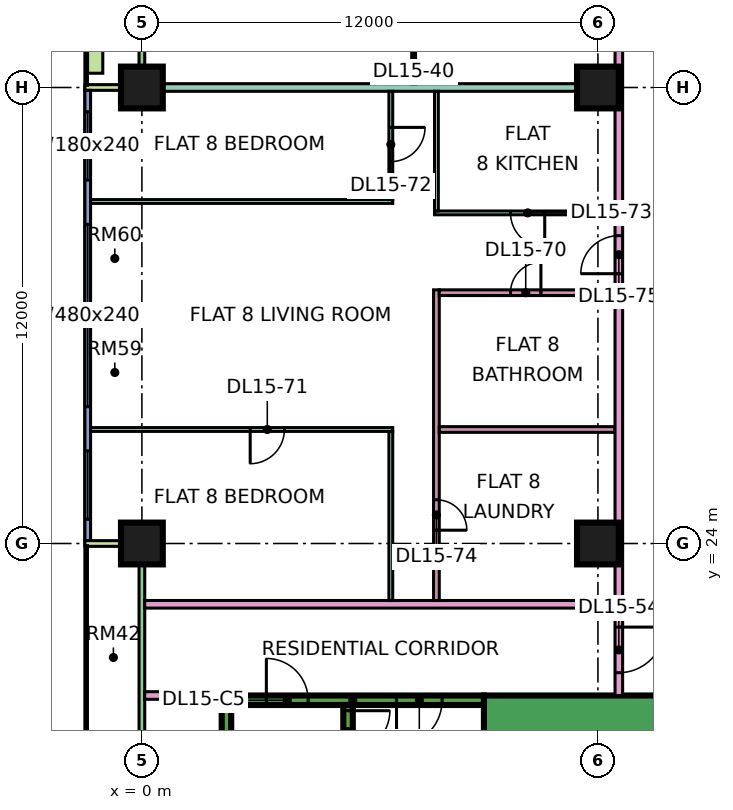
"""IFC4 building model, lengths in metres.
Left out: names, types, materials, properties, quantities, classifications, styles, units other than length and angle.
Written with IfcOpenShell. Run it as: python <this file> out.ifc"""

import sys

from ifc_helpers import new_model, si_unit, direction, frame, frame_2d, origin, origin_2d, place, context, subcontext, project, spatial, rectangle, extrude, element, fill, save


model = new_model("IFC4")
c1 = context("Model", 3, precision=1e-05, world=origin(), true_north=direction((0.0, 1.0)))
c2 = subcontext(c1, "Body", "Model", "MODEL_VIEW")
j1 = project(units=[si_unit("LENGTHUNIT", "METRE"), si_unit("PLANEANGLEUNIT", "RADIAN")], contexts=[c1])
p1 = place(None, origin())
s1 = spatial("IfcSite", under=j1, at=p1, CompositionType="ELEMENT")
p2 = place(p1, origin())
s2 = spatial("IfcBuilding", under=s1, at=p2, CompositionType="ELEMENT")
p3 = place(p2, frame((0.0, 0.0, 71.4)))
s3 = spatial("IfcBuildingStorey", under=s2, at=p3, CompositionType="ELEMENT", Elevation=71.4)
p4 = place(p3, frame((0.0, 24.0, 0.0), z_axis=(0.0, 0.0, 1.0), x_axis=(1.0, 0.0, 0.0)))
e1 = element("IfcColumn", 1, at=p4, inside=s3, PredefinedType="COLUMN", context=c2, shape_type="SweptSolid", body=[
    extrude(rectangle(XDim=1.1, YDim=1.1, at=origin_2d()), origin(), (0.0, 0.0, 1.0), 3.75),
])
p5 = place(p3, frame((0.0, 36.0, 0.0), z_axis=(0.0, 0.0, 1.0), x_axis=(1.0, 0.0, 0.0)))
e2 = element("IfcColumn", 2, at=p5, inside=s3, PredefinedType="COLUMN", context=c2, shape_type="SweptSolid", body=[
    extrude(rectangle(XDim=1.1, YDim=1.1, at=origin_2d()), origin(), (0.0, 0.0, 1.0), 3.75),
])
for number, where, z_axis, x_axis in (
    (3, (12.0, 24.0, 0.0), (0.0, 0.0, 1.0), (1.0, 0.0, 0.0)),
    (4, (12.0, 36.0, 0.0), (0.0, 0.0, 1.0), (1.0, 0.0, 0.0)),
):
    element("IfcColumn", number, at=place(p3, frame(where, z_axis=z_axis, x_axis=x_axis)), inside=s3, PredefinedType="COLUMN", context=c2, shape_type="SweptSolid", body=[
        extrude(rectangle(XDim=1.1, YDim=1.1, at=origin_2d()), origin(), (0.0, 0.0, 1.0), 3.75),
    ])
p6 = place(p3, frame((9.0, 19.45, 0.0), z_axis=(0.0, 0.0, 1.0), x_axis=(1.0, 0.0, 0.0)))
e5 = element("IfcWall", 5, at=p6, inside=s3, PredefinedType="SHEAR", context=c2, shape_type="SweptSolid", body=[
    extrude(rectangle(XDim=25.0, YDim=1.1, at=frame_2d((12.5, 0.0))), origin(), (0.0, 0.0, 1.0), 3.75),
])
p7 = place(p6, frame((19.1, 0.0, 0.0)))
e6 = element("IfcOpeningElement", 6, at=p7, cuts=e5, PredefinedType="OPENING", context=c2, shape_type="SweptSolid", body=[
    extrude(rectangle(XDim=1.8, YDim=2.4, at=frame_2d((0.9, 1.2))), frame((0.0, 0.56, 0.0), z_axis=(0.0, -1.0, 0.0), x_axis=(1.0, 0.0, 0.0)), (0.0, 0.0, 1.0), 1.12),
])
p8 = place(p3, frame((2.1, 19.875, 0.0), z_axis=(0.0, 0.0, 1.0), x_axis=(1.0, 0.0, 0.0)))
e7 = element("IfcWall", 7, at=p8, inside=s3, PredefinedType="SHEAR", context=c2, shape_type="SweptSolid", body=[
    extrude(rectangle(XDim=6.9, YDim=0.25, at=frame_2d((3.45, 0.0))), origin(), (0.0, 0.0, 1.0), 3.75),
])
p9 = place(p8, frame((1.175, 0.0, 0.0)))
e8 = element("IfcOpeningElement", 8, at=p9, cuts=e7, PredefinedType="OPENING", context=c2, shape_type="SweptSolid", body=[
    extrude(rectangle(XDim=1.1, YDim=2.2, at=frame_2d((0.55, 1.1))), frame((0.0, 0.135, 0.0), z_axis=(0.0, -1.0, 0.0), x_axis=(1.0, 0.0, 0.0)), (0.0, 0.0, 1.0), 0.27),
])
p10 = place(p8, frame((4.6, 0.0, 0.0)))
e9 = element("IfcOpeningElement", 9, at=p10, cuts=e7, PredefinedType="OPENING", context=c2, shape_type="SweptSolid", body=[
    extrude(rectangle(XDim=1.2, YDim=2.2, at=frame_2d((0.6, 1.1))), frame((0.0, 0.135, 0.0), z_axis=(0.0, -1.0, 0.0), x_axis=(1.0, 0.0, 0.0)), (0.0, 0.0, 1.0), 0.27),
])
p11 = place(p3, frame((2.225, 13.25, 0.0), z_axis=(0.0, 0.0, 1.0), x_axis=(0.0, 1.0, 0.0)))
e10 = element("IfcWall", 10, at=p11, inside=s3, PredefinedType="SHEAR", context=c2, shape_type="SweptSolid", body=[
    extrude(rectangle(XDim=6.5, YDim=0.25, at=frame_2d((3.25, 0.0))), origin(), (0.0, 0.0, 1.0), 3.75),
])
p12 = place(p3, frame((5.425, 13.25, 0.0), z_axis=(0.0, 0.0, 1.0), x_axis=(0.0, 1.0, 0.0)))
e11 = element("IfcWall", 11, at=p12, inside=s3, PredefinedType="SHEAR", context=c2, shape_type="SweptSolid", body=[
    extrude(rectangle(XDim=6.5, YDim=0.25, at=frame_2d((3.25, 0.0))), origin(), (0.0, 0.0, 1.0), 3.75),
])
p13 = place(p12, frame((5.25, 0.0, 0.0)))
e12 = element("IfcOpeningElement", 12, at=p13, cuts=e11, PredefinedType="OPENING", context=c2, shape_type="SweptSolid", body=[
    extrude(rectangle(XDim=1.1, YDim=2.2, at=frame_2d((0.55, 1.1))), frame((0.0, 0.135, 0.0), z_axis=(0.0, -1.0, 0.0), x_axis=(1.0, 0.0, 0.0)), (0.0, 0.0, 1.0), 0.27),
])
p14 = place(p3, frame((0.0, 47.925, 0.0), z_axis=(0.0, 0.0, 1.0), x_axis=(0.0, -1.0, 0.0)))
e13 = element("IfcWall", 13, at=p14, inside=s3, PredefinedType="SOLIDWALL", context=c2, shape_type="SweptSolid", body=[
    extrude(rectangle(XDim=11.85, YDim=0.15, at=frame_2d((5.925, 0.0))), origin(), (0.0, 0.0, 1.0), 3.35),
])
p15 = place(p14, frame((0.538, 0.0, 0.45)))
e14 = element("IfcOpeningElement", 14, at=p15, cuts=e13, PredefinedType="OPENING", context=c2, shape_type="SweptSolid", body=[
    extrude(rectangle(XDim=1.2, YDim=2.4, at=frame_2d((0.6, 1.2))), frame((0.0, 0.085, 0.0), z_axis=(0.0, -1.0, 0.0), x_axis=(1.0, 0.0, 0.0)), (0.0, 0.0, 1.0), 0.17),
])
p16 = place(p14, frame((4.15, 0.0, 0.45)))
e15 = element("IfcOpeningElement", 15, at=p16, cuts=e13, PredefinedType="OPENING", context=c2, shape_type="SweptSolid", body=[
    extrude(rectangle(XDim=1.2, YDim=2.4, at=frame_2d((0.6, 1.2))), frame((0.0, 0.085, 0.0), z_axis=(0.0, -1.0, 0.0), x_axis=(1.0, 0.0, 0.0)), (0.0, 0.0, 1.0), 0.17),
])
p17 = place(p14, frame((6.525, 0.0, 0.0)))
e16 = element("IfcOpeningElement", 16, at=p17, cuts=e13, PredefinedType="OPENING", context=c2, shape_type="SweptSolid", body=[
    extrude(rectangle(XDim=1.8, YDim=2.4, at=frame_2d((0.9, 1.2))), frame((0.0, 0.085, 0.0), z_axis=(0.0, -1.0, 0.0), x_axis=(1.0, 0.0, 0.0)), (0.0, 0.0, 1.0), 0.17),
])
p18 = place(p14, frame((9.5, 0.0, 0.45)))
e17 = element("IfcOpeningElement", 17, at=p18, cuts=e13, PredefinedType="OPENING", context=c2, shape_type="SweptSolid", body=[
    extrude(rectangle(XDim=1.2, YDim=2.4, at=frame_2d((0.6, 1.2))), frame((0.0, 0.085, 0.0), z_axis=(0.0, -1.0, 0.0), x_axis=(1.0, 0.0, 0.0)), (0.0, 0.0, 1.0), 0.17),
])
p19 = place(p3, frame((-1.5, 36.0, 0.0), z_axis=(0.0, 0.0, 1.0), x_axis=(1.0, 0.0, 0.0)))
e18 = element("IfcWall", 18, at=p19, inside=s3, PredefinedType="SOLIDWALL", context=c2, shape_type="SweptSolid", body=[
    extrude(rectangle(XDim=1.5, YDim=0.15, at=frame_2d((0.75, 0.0))), origin(), (0.0, 0.0, 1.0), 3.35),
])
p20 = place(p3, frame((-1.425, 35.925, 0.0), z_axis=(0.0, 0.0, 1.0), x_axis=(0.0, -1.0, 0.0)))
e19 = element("IfcWall", 19, at=p20, inside=s3, PredefinedType="SOLIDWALL", context=c2, shape_type="SweptSolid", body=[
    extrude(rectangle(XDim=11.85, YDim=0.15, at=frame_2d((5.925, 0.0))), origin(), (0.0, 0.0, 1.0), 3.35),
])
p21 = place(p20, frame((0.562, 0.0, 0.45)))
e20 = element("IfcOpeningElement", 20, at=p21, cuts=e19, PredefinedType="OPENING", context=c2, shape_type="SweptSolid", body=[
    extrude(rectangle(XDim=1.8, YDim=2.4, at=frame_2d((0.9, 1.2))), frame((0.0, 0.085, 0.0), z_axis=(0.0, -1.0, 0.0), x_axis=(1.0, 0.0, 0.0)), (0.0, 0.0, 1.0), 0.17),
])
p22 = place(p20, frame((3.525, 0.0, 0.45)))
e21 = element("IfcOpeningElement", 21, at=p22, cuts=e19, PredefinedType="OPENING", context=c2, shape_type="SweptSolid", body=[
    extrude(rectangle(XDim=4.8, YDim=2.4, at=frame_2d((2.4, 1.2))), frame((0.0, 0.085, 0.0), z_axis=(0.0, -1.0, 0.0), x_axis=(1.0, 0.0, 0.0)), (0.0, 0.0, 1.0), 0.17),
])
p23 = place(p20, frame((9.488, 0.0, 0.45)))
e22 = element("IfcOpeningElement", 22, at=p23, cuts=e19, PredefinedType="OPENING", context=c2, shape_type="SweptSolid", body=[
    extrude(rectangle(XDim=1.8, YDim=2.4, at=frame_2d((0.9, 1.2))), frame((0.0, 0.085, 0.0), z_axis=(0.0, -1.0, 0.0), x_axis=(1.0, 0.0, 0.0)), (0.0, 0.0, 1.0), 0.17),
])
p24 = place(p3, frame((0.0, 23.925, 0.0), z_axis=(0.0, 0.0, 1.0), x_axis=(0.0, -1.0, 0.0)))
e23 = element("IfcWall", 23, at=p24, inside=s3, PredefinedType="SOLIDWALL", context=c2, shape_type="SweptSolid", body=[
    extrude(rectangle(XDim=11.35, YDim=0.15, at=frame_2d((5.675, 0.0))), origin(), (0.0, 0.0, 1.0), 3.35),
])
p25 = place(p24, frame((6.738, 0.0, 0.0)))
e24 = element("IfcOpeningElement", 24, at=p25, cuts=e23, PredefinedType="OPENING", context=c2, shape_type="SweptSolid", body=[
    extrude(rectangle(XDim=1.8, YDim=2.4, at=frame_2d((0.9, 1.2))), frame((0.0, 0.085, 0.0), z_axis=(0.0, -1.0, 0.0), x_axis=(1.0, 0.0, 0.0)), (0.0, 0.0, 1.0), 0.17),
])
p26 = place(p3, frame((-1.5, 24.0, 0.0), z_axis=(0.0, 0.0, 1.0), x_axis=(1.0, 0.0, 0.0)))
e25 = element("IfcWall", 25, at=p26, inside=s3, PredefinedType="SOLIDWALL", context=c2, shape_type="SweptSolid", body=[
    extrude(rectangle(XDim=1.5, YDim=0.15, at=frame_2d((0.75, 0.0))), origin(), (0.0, 0.0, 1.0), 3.35),
])
p27 = place(p3, frame((-1.229, 47.625, 0.0), z_axis=(0.0, 0.0, 1.0), x_axis=(0.0, -1.0, 0.0)))
e26 = element("IfcWall", 26, at=p27, inside=s3, PredefinedType="SOLIDWALL", context=c2, shape_type="SweptSolid", body=[
    extrude(rectangle(XDim=11.25, YDim=0.4, at=frame_2d((5.625, 0.0))), origin(), (0.0, 0.0, 1.0), 0.7),
])
p28 = place(p3, frame((-1.35, 27.0, 0.0), z_axis=(0.0, 0.0, 1.0), x_axis=(1.0, 0.0, 0.0)))
e27 = element("IfcWall", 27, at=p28, inside=s3, PredefinedType="PARTITIONING", context=c2, shape_type="SweptSolid", body=[
    extrude(rectangle(XDim=7.95, YDim=0.1, at=frame_2d((3.975, 0.0))), origin(), (0.0, 0.0, 1.0), 3.35),
])
p29 = place(p28, frame((4.2, 0.0, 0.0)))
e28 = element("IfcOpeningElement", 28, at=p29, cuts=e27, PredefinedType="OPENING", context=c2, shape_type="SweptSolid", body=[
    extrude(rectangle(XDim=0.9, YDim=2.1, at=frame_2d((0.45, 1.05))), frame((0.0, 0.06, 0.0), z_axis=(0.0, -1.0, 0.0), x_axis=(1.0, 0.0, 0.0)), (0.0, 0.0, 1.0), 0.12),
])
p30 = place(p3, frame((-1.35, 33.0, 0.0), z_axis=(0.0, 0.0, 1.0), x_axis=(1.0, 0.0, 0.0)))
e29 = element("IfcWall", 29, at=p30, inside=s3, PredefinedType="PARTITIONING", context=c2, shape_type="SweptSolid", body=[
    extrude(rectangle(XDim=7.95, YDim=0.1, at=frame_2d((3.975, 0.0))), origin(), (0.0, 0.0, 1.0), 3.35),
])
e30 = element("IfcWall", 30, at=p5, inside=s3, PredefinedType="PARTITIONING", context=c2, shape_type="SweptSolid", body=[
    extrude(rectangle(XDim=12.45, YDim=0.2, at=frame_2d((6.225, 0.0))), origin(), (0.0, 0.0, 1.0), 3.35),
])
p31 = place(p3, frame((0.074, 20.0, 0.0), z_axis=(0.0, 0.0, 1.0), x_axis=(1.0, 0.0, 0.0)))
e31 = element("IfcWall", 31, at=p31, inside=s3, PredefinedType="PARTITIONING", context=c2, shape_type="SweptSolid", body=[
    extrude(rectangle(XDim=2.026, YDim=0.2, at=frame_2d((1.013, 0.0))), origin(), (0.0, 0.0, 1.0), 3.35),
])
p32 = place(p3, frame((0.074, 22.4, 0.0), z_axis=(0.0, 0.0, 1.0), x_axis=(1.0, 0.0, 0.0)))
e32 = element("IfcWall", 32, at=p32, inside=s3, PredefinedType="PARTITIONING", context=c2, shape_type="SweptSolid", body=[
    extrude(rectangle(XDim=12.376, YDim=0.2, at=frame_2d((6.188, 0.0))), origin(), (0.0, 0.0, 1.0), 3.35),
])
p33 = place(p3, frame((6.55, 22.5, 0.0), z_axis=(0.0, 0.0, 1.0), x_axis=(0.0, 1.0, 0.0)))
e33 = element("IfcWall", 33, at=p33, inside=s3, PredefinedType="PARTITIONING", context=c2, shape_type="SweptSolid", body=[
    extrude(rectangle(XDim=4.45, YDim=0.1, at=frame_2d((2.225, 0.0))), origin(), (0.0, 0.0, 1.0), 3.35),
])
p34 = place(p3, frame((6.55, 33.05, 0.0), z_axis=(0.0, 0.0, 1.0), x_axis=(0.0, 1.0, 0.0)))
e34 = element("IfcWall", 34, at=p34, inside=s3, PredefinedType="PARTITIONING", context=c2, shape_type="SweptSolid", body=[
    extrude(rectangle(XDim=2.85, YDim=0.1, at=frame_2d((1.425, 0.0))), origin(), (0.0, 0.0, 1.0), 3.35),
])
p35 = place(p34, frame((1.0, 0.0, 0.0)))
e35 = element("IfcOpeningElement", 35, at=p35, cuts=e34, PredefinedType="OPENING", context=c2, shape_type="SweptSolid", body=[
    extrude(rectangle(XDim=0.9, YDim=2.1, at=frame_2d((0.45, 1.05))), frame((0.0, 0.06, 0.0), z_axis=(0.0, -1.0, 0.0), x_axis=(1.0, 0.0, 0.0)), (0.0, 0.0, 1.0), 0.12),
])
p36 = place(p3, frame((7.15, 36.1, 0.0), z_axis=(0.0, 0.0, 1.0), x_axis=(0.0, 1.0, 0.0)))
e36 = element("IfcWall", 36, at=p36, inside=s3, PredefinedType="PARTITIONING", context=c2, shape_type="SweptSolid", body=[
    extrude(rectangle(XDim=2.85, YDim=0.1, at=frame_2d((1.425, 0.0))), origin(), (0.0, 0.0, 1.0), 3.35),
])
p37 = place(p36, frame((0.95, 0.0, 0.0)))
e37 = element("IfcOpeningElement", 37, at=p37, cuts=e36, PredefinedType="OPENING", context=c2, shape_type="SweptSolid", body=[
    extrude(rectangle(XDim=0.9, YDim=2.1, at=frame_2d((0.45, 1.05))), frame((0.0, 0.06, 0.0), z_axis=(0.0, -1.0, 0.0), x_axis=(1.0, 0.0, 0.0)), (0.0, 0.0, 1.0), 0.12),
])
p38 = place(p3, frame((7.7, 32.7, 0.0), z_axis=(0.0, 0.0, 1.0), x_axis=(1.0, 0.0, 0.0)))
e38 = element("IfcWall", 38, at=p38, inside=s3, PredefinedType="PARTITIONING", context=c2, shape_type="SweptSolid", body=[
    extrude(rectangle(XDim=4.75, YDim=0.1, at=frame_2d((2.375, 0.0))), origin(), (0.0, 0.0, 1.0), 3.35),
])
p39 = place(p38, frame((2.0, 0.0, 0.0)))
e39 = element("IfcOpeningElement", 39, at=p39, cuts=e38, PredefinedType="OPENING", context=c2, shape_type="SweptSolid", body=[
    extrude(rectangle(XDim=0.9, YDim=2.1, at=frame_2d((0.45, 1.05))), frame((0.0, 0.06, 0.0), z_axis=(0.0, -1.0, 0.0), x_axis=(1.0, 0.0, 0.0)), (0.0, 0.0, 1.0), 0.12),
])
p40 = place(p3, frame((7.75, 22.5, 0.0), z_axis=(0.0, 0.0, 1.0), x_axis=(0.0, 1.0, 0.0)))
e40 = element("IfcWall", 40, at=p40, inside=s3, PredefinedType="PARTITIONING", context=c2, shape_type="SweptSolid", body=[
    extrude(rectangle(XDim=8.175, YDim=0.15, at=frame_2d((4.087, 0.0))), origin(), (0.0, 0.0, 1.0), 3.35),
])
p41 = place(p40, frame((1.85, 0.0, 0.0)))
e41 = element("IfcOpeningElement", 41, at=p41, cuts=e40, PredefinedType="OPENING", context=c2, shape_type="SweptSolid", body=[
    extrude(rectangle(XDim=0.8, YDim=2.1, at=frame_2d((0.4, 1.05))), frame((0.0, 0.085, 0.0), z_axis=(0.0, -1.0, 0.0), x_axis=(1.0, 0.0, 0.0)), (0.0, 0.0, 1.0), 0.17),
])
p42 = place(p3, frame((7.75, 32.75, 0.0), z_axis=(0.0, 0.0, 1.0), x_axis=(0.0, 1.0, 0.0)))
e42 = element("IfcWall", 42, at=p42, inside=s3, PredefinedType="PARTITIONING", context=c2, shape_type="SweptSolid", body=[
    extrude(rectangle(XDim=3.15, YDim=0.1, at=frame_2d((1.575, 0.0))), origin(), (0.0, 0.0, 1.0), 3.35),
])
p43 = place(p3, frame((7.825, 27.0, 0.0), z_axis=(0.0, 0.0, 1.0), x_axis=(1.0, 0.0, 0.0)))
e43 = element("IfcWall", 43, at=p43, inside=s3, PredefinedType="PARTITIONING", context=c2, shape_type="SweptSolid", body=[
    extrude(rectangle(XDim=4.625, YDim=0.15, at=frame_2d((2.312, 0.0))), origin(), (0.0, 0.0, 1.0), 3.35),
])
p44 = place(p3, frame((7.825, 30.6, 0.0), z_axis=(0.0, 0.0, 1.0), x_axis=(1.0, 0.0, 0.0)))
e44 = element("IfcWall", 44, at=p44, inside=s3, PredefinedType="PARTITIONING", context=c2, shape_type="SweptSolid", body=[
    extrude(rectangle(XDim=4.625, YDim=0.15, at=frame_2d((2.312, 0.0))), origin(), (0.0, 0.0, 1.0), 3.35),
])
p45 = place(p44, frame((1.875, 0.0, 0.0)))
e45 = element("IfcOpeningElement", 45, at=p45, cuts=e44, PredefinedType="OPENING", context=c2, shape_type="SweptSolid", body=[
    extrude(rectangle(XDim=0.8, YDim=2.1, at=frame_2d((0.4, 1.05))), frame((0.0, 0.085, 0.0), z_axis=(0.0, -1.0, 0.0), x_axis=(1.0, 0.0, 0.0)), (0.0, 0.0, 1.0), 0.17),
])
p46 = place(p3, frame((12.55, 20.0, 0.0), z_axis=(0.0, 0.0, 1.0), x_axis=(0.0, 1.0, 0.0)))
e46 = element("IfcWall", 46, at=p46, inside=s3, PredefinedType="PARTITIONING", context=c2, shape_type="SweptSolid", body=[
    extrude(rectangle(XDim=42.926, YDim=0.2, at=frame_2d((21.463, 0.0))), origin(), (0.0, 0.0, 1.0), 3.35),
])
p47 = place(p46, frame((17.1, 0.0, 0.0)))
e47 = element("IfcOpeningElement", 47, at=p47, cuts=e46, PredefinedType="OPENING", context=c2, shape_type="SweptSolid", body=[
    extrude(rectangle(XDim=1.0, YDim=2.1, at=frame_2d((0.5, 1.05))), frame((0.0, 0.11, 0.0), z_axis=(0.0, -1.0, 0.0), x_axis=(1.0, 0.0, 0.0)), (0.0, 0.0, 1.0), 0.22),
])
p48 = place(p46, frame((28.95, 0.0, 0.0)))
e48 = element("IfcOpeningElement", 48, at=p48, cuts=e46, PredefinedType="OPENING", context=c2, shape_type="SweptSolid", body=[
    extrude(rectangle(XDim=1.0, YDim=2.1, at=frame_2d((0.5, 1.05))), frame((0.0, 0.11, 0.0), z_axis=(0.0, -1.0, 0.0), x_axis=(1.0, 0.0, 0.0)), (0.0, 0.0, 1.0), 0.22),
])
p49 = place(p46, frame((0.6, 0.0, 0.0)))
e49 = element("IfcOpeningElement", 49, at=p49, cuts=e46, PredefinedType="OPENING", context=c2, shape_type="SweptSolid", body=[
    extrude(rectangle(XDim=1.2, YDim=2.1, at=frame_2d((0.6, 1.05))), frame((0.0, 0.11, 0.0), z_axis=(0.0, -1.0, 0.0), x_axis=(1.0, 0.0, 0.0)), (0.0, 0.0, 1.0), 0.22),
])
p50 = place(p46, frame((11.1, 0.0, 0.0)))
e50 = element("IfcOpeningElement", 50, at=p50, cuts=e46, PredefinedType="OPENING", context=c2, shape_type="SweptSolid", body=[
    extrude(rectangle(XDim=1.0, YDim=2.1, at=frame_2d((0.5, 1.05))), frame((0.0, 0.11, 0.0), z_axis=(0.0, -1.0, 0.0), x_axis=(1.0, 0.0, 0.0)), (0.0, 0.0, 1.0), 0.22),
])
p51 = place(p21, origin())
e51 = element("IfcWindow", 51, at=p51, inside=s3, PartitioningType="SINGLE_PANEL", PredefinedType="WINDOW", context=c2, shape_type="SweptSolid", body=[
    extrude(rectangle(XDim=1.8, YDim=2.4, at=frame_2d((0.9, 1.2))), frame((0.0, 0.03, 0.0), z_axis=(0.0, -1.0, 0.0), x_axis=(1.0, 0.0, 0.0)), (0.0, 0.0, 1.0), 0.06),
])
fill(e20, e51)
p52 = place(p22, origin())
e52 = element("IfcWindow", 52, at=p52, inside=s3, PartitioningType="SINGLE_PANEL", PredefinedType="WINDOW", context=c2, shape_type="SweptSolid", body=[
    extrude(rectangle(XDim=4.8, YDim=2.4, at=frame_2d((2.4, 1.2))), frame((0.0, 0.03, 0.0), z_axis=(0.0, -1.0, 0.0), x_axis=(1.0, 0.0, 0.0)), (0.0, 0.0, 1.0), 0.06),
])
fill(e21, e52)
p53 = place(p23, origin())
e53 = element("IfcWindow", 53, at=p53, inside=s3, PartitioningType="SINGLE_PANEL", PredefinedType="WINDOW", context=c2, shape_type="SweptSolid", body=[
    extrude(rectangle(XDim=1.8, YDim=2.4, at=frame_2d((0.9, 1.2))), frame((0.0, 0.03, 0.0), z_axis=(0.0, -1.0, 0.0), x_axis=(1.0, 0.0, 0.0)), (0.0, 0.0, 1.0), 0.06),
])
fill(e22, e53)
p54 = place(p13, origin())
e54 = element("IfcDoor", 54, at=p54, inside=s3, OperationType="SINGLE_SWING_RIGHT", PredefinedType="DOOR", context=c2, shape_type="SweptSolid", body=[
    extrude(rectangle(XDim=1.1, YDim=2.2, at=frame_2d((0.55, 1.1))), frame((0.0, 0.025, 0.0), z_axis=(0.0, -1.0, 0.0), x_axis=(1.0, 0.0, 0.0)), (0.0, 0.0, 1.0), 0.05),
])
fill(e12, e54)
p55 = place(p9, origin())
e55 = element("IfcDoor", 55, at=p55, inside=s3, OperationType="SINGLE_SWING_LEFT", PredefinedType="DOOR", context=c2, shape_type="SweptSolid", body=[
    extrude(rectangle(XDim=1.1, YDim=2.2, at=frame_2d((0.55, 1.1))), frame((0.0, 0.025, 0.0), z_axis=(0.0, -1.0, 0.0), x_axis=(1.0, 0.0, 0.0)), (0.0, 0.0, 1.0), 0.05),
])
fill(e8, e55)
p56 = place(p10, frame((1.2, 0.0, 0.0), z_axis=(0.0, 0.0, 1.0), x_axis=(-1.0, 0.0, 0.0)))
e56 = element("IfcDoor", 56, at=p56, inside=s3, OperationType="SINGLE_SWING_LEFT", PredefinedType="DOOR", context=c2, shape_type="SweptSolid", body=[
    extrude(rectangle(XDim=1.2, YDim=2.2, at=frame_2d((0.6, 1.1))), frame((0.0, 0.025, 0.0), z_axis=(0.0, -1.0, 0.0), x_axis=(1.0, 0.0, 0.0)), (0.0, 0.0, 1.0), 0.05),
])
fill(e9, e56)
p57 = place(p49, origin())
e57 = element("IfcDoor", 57, at=p57, inside=s3, OperationType="SINGLE_SWING_RIGHT", PredefinedType="DOOR", context=c2, shape_type="SweptSolid", body=[
    extrude(rectangle(XDim=1.2, YDim=2.1, at=frame_2d((0.6, 1.05))), frame((0.0, 0.025, 0.0), z_axis=(0.0, -1.0, 0.0), x_axis=(1.0, 0.0, 0.0)), (0.0, 0.0, 1.0), 0.05),
])
fill(e49, e57)
p58 = place(p45, frame((0.8, 0.0, 0.0), z_axis=(0.0, 0.0, 1.0), x_axis=(-1.0, 0.0, 0.0)))
e58 = element("IfcDoor", 58, at=p58, inside=s3, OperationType="SINGLE_SWING_RIGHT", PredefinedType="DOOR", context=c2, shape_type="SweptSolid", body=[
    extrude(rectangle(XDim=0.8, YDim=2.1, at=frame_2d((0.4, 1.05))), frame((0.0, 0.025, 0.0), z_axis=(0.0, -1.0, 0.0), x_axis=(1.0, 0.0, 0.0)), (0.0, 0.0, 1.0), 0.05),
])
fill(e45, e58)
p59 = place(p29, frame((0.9, 0.0, 0.0), z_axis=(0.0, 0.0, 1.0), x_axis=(-1.0, 0.0, 0.0)))
e59 = element("IfcDoor", 59, at=p59, inside=s3, OperationType="SINGLE_SWING_LEFT", PredefinedType="DOOR", context=c2, shape_type="SweptSolid", body=[
    extrude(rectangle(XDim=0.9, YDim=2.1, at=frame_2d((0.45, 1.05))), frame((0.0, 0.025, 0.0), z_axis=(0.0, -1.0, 0.0), x_axis=(1.0, 0.0, 0.0)), (0.0, 0.0, 1.0), 0.05),
])
fill(e28, e59)
p60 = place(p35, origin())
e60 = element("IfcDoor", 60, at=p60, inside=s3, OperationType="SINGLE_SWING_RIGHT", PredefinedType="DOOR", context=c2, shape_type="SweptSolid", body=[
    extrude(rectangle(XDim=0.9, YDim=2.1, at=frame_2d((0.45, 1.05))), frame((0.0, 0.025, 0.0), z_axis=(0.0, -1.0, 0.0), x_axis=(1.0, 0.0, 0.0)), (0.0, 0.0, 1.0), 0.05),
])
fill(e35, e60)
p61 = place(p39, origin())
e61 = element("IfcDoor", 61, at=p61, inside=s3, OperationType="SINGLE_SWING_RIGHT", PredefinedType="DOOR", context=c2, shape_type="SweptSolid", body=[
    extrude(rectangle(XDim=0.9, YDim=2.1, at=frame_2d((0.45, 1.05))), frame((0.0, 0.025, 0.0), z_axis=(0.0, -1.0, 0.0), x_axis=(1.0, 0.0, 0.0)), (0.0, 0.0, 1.0), 0.05),
])
fill(e39, e61)
p62 = place(p41, frame((0.8, 0.0, 0.0), z_axis=(0.0, 0.0, 1.0), x_axis=(-1.0, 0.0, 0.0)))
e62 = element("IfcDoor", 62, at=p62, inside=s3, OperationType="SINGLE_SWING_LEFT", PredefinedType="DOOR", context=c2, shape_type="SweptSolid", body=[
    extrude(rectangle(XDim=0.8, YDim=2.1, at=frame_2d((0.4, 1.05))), frame((0.0, 0.025, 0.0), z_axis=(0.0, -1.0, 0.0), x_axis=(1.0, 0.0, 0.0)), (0.0, 0.0, 1.0), 0.05),
])
fill(e41, e62)
p63 = place(p50, origin())
e63 = element("IfcDoor", 63, at=p63, inside=s3, OperationType="SINGLE_SWING_LEFT", PredefinedType="DOOR", context=c2, shape_type="SweptSolid", body=[
    extrude(rectangle(XDim=1.0, YDim=2.1, at=frame_2d((0.5, 1.05))), frame((0.0, 0.025, 0.0), z_axis=(0.0, -1.0, 0.0), x_axis=(1.0, 0.0, 0.0)), (0.0, 0.0, 1.0), 0.05),
])
fill(e50, e63)
save(model, sys.argv[1])
